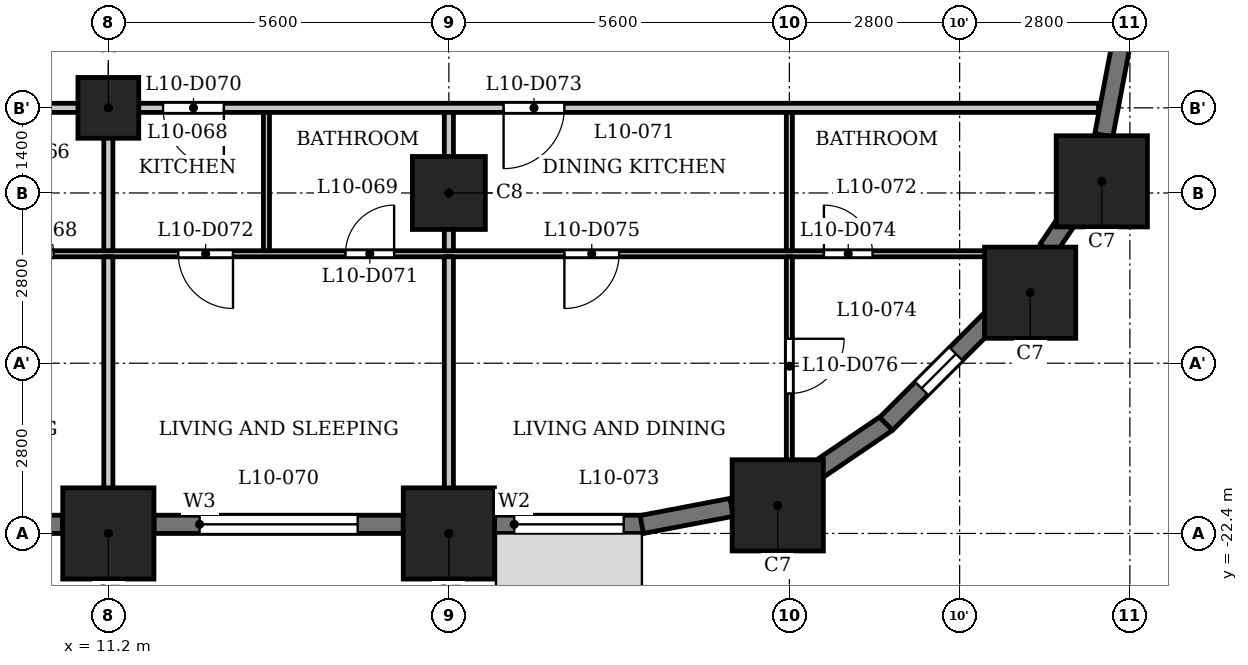
"""IFC4 building model, lengths in metres.
Left out: names, types, materials, properties, quantities, classifications, styles, units other than length and angle.
Written with IfcOpenShell. Run it as: python <this file> out.ifc"""

import sys

from ifc_helpers import new_model, si_unit, direction, frame, frame_2d, origin, origin_2d, place, context, subcontext, project, spatial, rectangle, extrude, element, fill, save


model = new_model("IFC4")
c1 = context("Model", 3, precision=1e-05, world=origin(), true_north=direction((0.0, 1.0)))
c2 = subcontext(c1, "Body", "Model", "MODEL_VIEW")
j1 = project(units=[si_unit("LENGTHUNIT", "METRE"), si_unit("PLANEANGLEUNIT", "RADIAN")], contexts=[c1])
p1 = place(None, origin())
s1 = spatial("IfcSite", under=j1, at=p1, CompositionType="ELEMENT")
p2 = place(p1, origin())
s2 = spatial("IfcBuilding", under=s1, at=p2, CompositionType="ELEMENT")
p3 = place(p2, frame((0.0, 0.0, 44.5)))
s3 = spatial("IfcBuildingStorey", under=s2, at=p3, CompositionType="ELEMENT", Elevation=44.5)
for number, where, z_axis, x_axis in (
    (1, (11.2, -22.4, 0.0), (0.0, 0.0, 1.0), (1.0, 0.0, 0.0)),
    (2, (16.8, -22.4, 0.0), (0.0, 0.0, 1.0), (1.0, 0.0, 0.0)),
    (3, (22.209, -21.938, 0.0), (0.0, 0.0, 1.0), (1.0, 0.0, 0.0)),
    (4, (26.36, -18.44, 0.0), (0.0, 0.0, 1.0), (1.0, 0.0, 0.0)),
    (5, (27.538, -16.609, 0.0), (0.0, 0.0, 1.0), (1.0, 0.0, 0.0)),
):
    element("IfcColumn", number, at=place(p3, frame(where, z_axis=z_axis, x_axis=x_axis)), inside=s3, PredefinedType="COLUMN", context=c2, shape_type="SweptSolid", body=[
        extrude(rectangle(XDim=1.5, YDim=1.5, at=origin_2d()), origin(), (0.0, 0.0, 1.0), 3.5),
    ])
p4 = place(p3, frame((16.8, -16.8, 0.0), z_axis=(0.0, 0.0, 1.0), x_axis=(1.0, 0.0, 0.0)))
e6 = element("IfcColumn", 6, at=p4, inside=s3, PredefinedType="COLUMN", context=c2, shape_type="SweptSolid", body=[
    extrude(rectangle(XDim=1.2, YDim=1.2, at=origin_2d()), origin(), (0.0, 0.0, 1.0), 3.5),
])
p5 = place(p3, frame((11.2, -15.4, 0.0), z_axis=(0.0, 0.0, 1.0), x_axis=(1.0, 0.0, 0.0)))
e7 = element("IfcColumn", 7, at=p5, inside=s3, PredefinedType="COLUMN", context=c2, shape_type="SweptSolid", body=[
    extrude(rectangle(XDim=1.0, YDim=1.0, at=origin_2d()), origin(), (0.0, 0.0, 1.0), 3.5),
])
p6 = place(p3, frame((6.35, -22.25, 0.0), z_axis=(0.0, 0.0, 1.0), x_axis=(1.0, 0.0, 0.0)))
e8 = element("IfcWall", 8, at=p6, inside=s3, PredefinedType="SOLIDWALL", context=c2, shape_type="SweptSolid", body=[
    extrude(rectangle(XDim=4.1, YDim=0.3, at=frame_2d((2.05, 0.0))), origin(), (0.0, 0.0, 1.0), 2.35),
])
p7 = place(p6, frame((0.75, 0.0, 0.9)))
e9 = element("IfcOpeningElement", 9, at=p7, cuts=e8, PredefinedType="OPENING", context=c2, shape_type="SweptSolid", body=[
    extrude(rectangle(XDim=2.6, YDim=1.25, at=frame_2d((1.3, 0.625))), frame((0.0, 0.16, 0.0), z_axis=(0.0, -1.0, 0.0), x_axis=(1.0, 0.0, 0.0)), (0.0, 0.0, 1.0), 0.32),
])
p8 = place(p3, frame((11.95, -22.25, 0.0), z_axis=(0.0, 0.0, 1.0), x_axis=(1.0, 0.0, 0.0)))
e10 = element("IfcWall", 10, at=p8, inside=s3, PredefinedType="SOLIDWALL", context=c2, shape_type="SweptSolid", body=[
    extrude(rectangle(XDim=4.1, YDim=0.3, at=frame_2d((2.05, 0.0))), origin(), (0.0, 0.0, 1.0), 2.35),
])
p9 = place(p8, frame((0.75, 0.0, 0.9)))
e11 = element("IfcOpeningElement", 11, at=p9, cuts=e10, PredefinedType="OPENING", context=c2, shape_type="SweptSolid", body=[
    extrude(rectangle(XDim=2.6, YDim=1.25, at=frame_2d((1.3, 0.625))), frame((0.0, 0.16, 0.0), z_axis=(0.0, -1.0, 0.0), x_axis=(1.0, 0.0, 0.0)), (0.0, 0.0, 1.0), 0.32),
])
p10 = place(p3, frame((17.55, -22.25, 0.0), z_axis=(0.0, 0.0, 1.0), x_axis=(1.0, 0.0, 0.0)))
e12 = element("IfcWall", 12, at=p10, inside=s3, PredefinedType="SOLIDWALL", context=c2, shape_type="SweptSolid", body=[
    extrude(rectangle(XDim=2.45, YDim=0.3, at=frame_2d((1.225, 0.0))), origin(), (0.0, 0.0, 1.0), 2.35),
])
p11 = place(p10, frame((0.325, 0.0, 0.9)))
e13 = element("IfcOpeningElement", 13, at=p11, cuts=e12, PredefinedType="OPENING", context=c2, shape_type="SweptSolid", body=[
    extrude(rectangle(XDim=1.8, YDim=1.25, at=frame_2d((0.9, 0.625))), frame((0.0, 0.16, 0.0), z_axis=(0.0, -1.0, 0.0), x_axis=(1.0, 0.0, 0.0)), (0.0, 0.0, 1.0), 0.32),
])
for number, where, z_axis, x_axis in (
    (14, (19.972, -22.253, 0.0), (0.0, 0.0, 1.0), (0.982, 0.187, 0.0)),
    (15, (22.767, -21.426, 0.0), (0.0, 0.0, 1.0), (0.827, 0.562, 0.0)),
):
    element("IfcWall", number, at=place(p3, frame(where, z_axis=z_axis, x_axis=x_axis)), inside=s3, PredefinedType="SOLIDWALL", context=c2, shape_type="SweptSolid", body=[
        extrude(rectangle(XDim=1.506, YDim=0.3, at=frame_2d((0.753, 0.0))), origin(), (0.0, 0.0, 1.0), 2.35),
    ])
p12 = place(p3, frame((23.991, -20.597, 0.0), z_axis=(0.0, 0.0, 1.0), x_axis=(0.707106781187, 0.707106781187, 0.0)))
e16 = element("IfcWall", 16, at=p12, inside=s3, PredefinedType="SOLIDWALL", context=c2, shape_type="SweptSolid", body=[
    extrude(rectangle(XDim=2.45, YDim=0.3, at=frame_2d((1.225, 0.0))), origin(), (0.0, 0.0, 1.0), 2.35),
])
p13 = place(p12, frame((0.825, 0.0, 0.6)))
e17 = element("IfcOpeningElement", 17, at=p13, cuts=e16, PredefinedType="OPENING", context=c2, shape_type="SweptSolid", body=[
    extrude(rectangle(XDim=0.8, YDim=1.55, at=frame_2d((0.4, 0.775))), frame((0.0, 0.16, 0.0), z_axis=(0.0, -1.0, 0.0), x_axis=(1.0, 0.0, 0.0)), (0.0, 0.0, 1.0), 0.32),
])
p14 = place(p3, frame((26.645, -17.727, 0.0), z_axis=(0.0, 0.0, 1.0), x_axis=(0.562083182981, 0.827080706709, 0.0)))
e18 = element("IfcWall", 18, at=p14, inside=s3, PredefinedType="SOLIDWALL", context=c2, shape_type="SweptSolid", body=[
    extrude(rectangle(XDim=0.677, YDim=0.3, at=frame_2d((0.339, 0.0))), origin(), (0.0, 0.0, 1.0), 3.2),
])
p15 = place(p3, frame((27.571, -15.851, 0.0), z_axis=(0.0, 0.0, 1.0), x_axis=(0.187223837635, 0.982317277982, 0.0)))
e19 = element("IfcWall", 19, at=p15, inside=s3, PredefinedType="SOLIDWALL", context=c2, shape_type="SweptSolid", body=[
    extrude(rectangle(XDim=1.506, YDim=0.3, at=frame_2d((0.753, 0.0))), origin(), (0.0, 0.0, 1.0), 2.35),
])
p16 = place(p3, frame((-26.394, -17.8, 0.0), z_axis=(0.0, 0.0, 1.0), x_axis=(1.0, 0.0, 0.0)))
e20 = element("IfcWall", 20, at=p16, inside=s3, PredefinedType="PARTITIONING", context=c2, shape_type="SweptSolid", body=[
    extrude(rectangle(XDim=53.126, YDim=0.1, at=frame_2d((26.563, 0.0))), origin(), (0.0, 0.0, 1.0), 3.2),
])
p17 = place(p16, frame((0.794, 0.0, 0.0)))
e21 = element("IfcOpeningElement", 21, at=p17, cuts=e20, PredefinedType="OPENING", context=c2, shape_type="SweptSolid", body=[
    extrude(rectangle(XDim=0.8, YDim=2.1, at=frame_2d((0.4, 1.05))), frame((0.0, 0.06, 0.0), z_axis=(0.0, -1.0, 0.0), x_axis=(1.0, 0.0, 0.0)), (0.0, 0.0, 1.0), 0.12),
])
p18 = place(p16, frame((5.644, 0.0, 0.0)))
e22 = element("IfcOpeningElement", 22, at=p18, cuts=e20, PredefinedType="OPENING", context=c2, shape_type="SweptSolid", body=[
    extrude(rectangle(XDim=0.9, YDim=2.1, at=frame_2d((0.45, 1.05))), frame((0.0, 0.06, 0.0), z_axis=(0.0, -1.0, 0.0), x_axis=(1.0, 0.0, 0.0)), (0.0, 0.0, 1.0), 0.12),
])
p19 = place(p16, frame((10.394, 0.0, 0.0)))
e23 = element("IfcOpeningElement", 23, at=p19, cuts=e20, PredefinedType="OPENING", context=c2, shape_type="SweptSolid", body=[
    extrude(rectangle(XDim=0.8, YDim=2.1, at=frame_2d((0.4, 1.05))), frame((0.0, 0.06, 0.0), z_axis=(0.0, -1.0, 0.0), x_axis=(1.0, 0.0, 0.0)), (0.0, 0.0, 1.0), 0.12),
])
p20 = place(p16, frame((13.244, 0.0, 0.0)))
e24 = element("IfcOpeningElement", 24, at=p20, cuts=e20, PredefinedType="OPENING", context=c2, shape_type="SweptSolid", body=[
    extrude(rectangle(XDim=0.9, YDim=2.1, at=frame_2d((0.45, 1.05))), frame((0.0, 0.06, 0.0), z_axis=(0.0, -1.0, 0.0), x_axis=(1.0, 0.0, 0.0)), (0.0, 0.0, 1.0), 0.12),
])
p21 = place(p16, frame((23.944, 0.0, 0.0)))
e25 = element("IfcOpeningElement", 25, at=p21, cuts=e20, PredefinedType="OPENING", context=c2, shape_type="SweptSolid", body=[
    extrude(rectangle(XDim=0.8, YDim=2.1, at=frame_2d((0.4, 1.05))), frame((0.0, 0.06, 0.0), z_axis=(0.0, -1.0, 0.0), x_axis=(1.0, 0.0, 0.0)), (0.0, 0.0, 1.0), 0.12),
])
p22 = place(p16, frame((22.194, 0.0, 0.0)))
e26 = element("IfcOpeningElement", 26, at=p22, cuts=e20, PredefinedType="OPENING", context=c2, shape_type="SweptSolid", body=[
    extrude(rectangle(XDim=0.9, YDim=2.1, at=frame_2d((0.45, 1.05))), frame((0.0, 0.06, 0.0), z_axis=(0.0, -1.0, 0.0), x_axis=(1.0, 0.0, 0.0)), (0.0, 0.0, 1.0), 0.12),
])
p23 = place(p16, frame((16.594, 0.0, 0.0)))
e27 = element("IfcOpeningElement", 27, at=p23, cuts=e20, PredefinedType="OPENING", context=c2, shape_type="SweptSolid", body=[
    extrude(rectangle(XDim=0.9, YDim=2.1, at=frame_2d((0.45, 1.05))), frame((0.0, 0.06, 0.0), z_axis=(0.0, -1.0, 0.0), x_axis=(1.0, 0.0, 0.0)), (0.0, 0.0, 1.0), 0.12),
])
p24 = place(p16, frame((18.844, 0.0, 0.0)))
e28 = element("IfcOpeningElement", 28, at=p24, cuts=e20, PredefinedType="OPENING", context=c2, shape_type="SweptSolid", body=[
    extrude(rectangle(XDim=0.9, YDim=2.1, at=frame_2d((0.45, 1.05))), frame((0.0, 0.06, 0.0), z_axis=(0.0, -1.0, 0.0), x_axis=(1.0, 0.0, 0.0)), (0.0, 0.0, 1.0), 0.12),
])
p25 = place(p16, frame((30.544, 0.0, 0.0)))
e29 = element("IfcOpeningElement", 29, at=p25, cuts=e20, PredefinedType="OPENING", context=c2, shape_type="SweptSolid", body=[
    extrude(rectangle(XDim=0.8, YDim=2.1, at=frame_2d((0.4, 1.05))), frame((0.0, 0.06, 0.0), z_axis=(0.0, -1.0, 0.0), x_axis=(1.0, 0.0, 0.0)), (0.0, 0.0, 1.0), 0.12),
])
p26 = place(p16, frame((27.294, 0.0, 0.0)))
e30 = element("IfcOpeningElement", 30, at=p26, cuts=e20, PredefinedType="OPENING", context=c2, shape_type="SweptSolid", body=[
    extrude(rectangle(XDim=0.9, YDim=2.1, at=frame_2d((0.45, 1.05))), frame((0.0, 0.06, 0.0), z_axis=(0.0, -1.0, 0.0), x_axis=(1.0, 0.0, 0.0)), (0.0, 0.0, 1.0), 0.12),
])
p27 = place(p16, frame((35.894, 0.0, 0.0)))
e31 = element("IfcOpeningElement", 31, at=p27, cuts=e20, PredefinedType="OPENING", context=c2, shape_type="SweptSolid", body=[
    extrude(rectangle(XDim=0.8, YDim=2.1, at=frame_2d((0.4, 1.05))), frame((0.0, 0.06, 0.0), z_axis=(0.0, -1.0, 0.0), x_axis=(1.0, 0.0, 0.0)), (0.0, 0.0, 1.0), 0.12),
])
p28 = place(p16, frame((33.644, 0.0, 0.0)))
e32 = element("IfcOpeningElement", 32, at=p28, cuts=e20, PredefinedType="OPENING", context=c2, shape_type="SweptSolid", body=[
    extrude(rectangle(XDim=0.9, YDim=2.1, at=frame_2d((0.45, 1.05))), frame((0.0, 0.06, 0.0), z_axis=(0.0, -1.0, 0.0), x_axis=(1.0, 0.0, 0.0)), (0.0, 0.0, 1.0), 0.12),
])
p29 = place(p16, frame((41.494, 0.0, 0.0)))
e33 = element("IfcOpeningElement", 33, at=p29, cuts=e20, PredefinedType="OPENING", context=c2, shape_type="SweptSolid", body=[
    extrude(rectangle(XDim=0.8, YDim=2.1, at=frame_2d((0.4, 1.05))), frame((0.0, 0.06, 0.0), z_axis=(0.0, -1.0, 0.0), x_axis=(1.0, 0.0, 0.0)), (0.0, 0.0, 1.0), 0.12),
])
p30 = place(p16, frame((38.744, 0.0, 0.0)))
e34 = element("IfcOpeningElement", 34, at=p30, cuts=e20, PredefinedType="OPENING", context=c2, shape_type="SweptSolid", body=[
    extrude(rectangle(XDim=0.9, YDim=2.1, at=frame_2d((0.45, 1.05))), frame((0.0, 0.06, 0.0), z_axis=(0.0, -1.0, 0.0), x_axis=(1.0, 0.0, 0.0)), (0.0, 0.0, 1.0), 0.12),
])
p31 = place(p16, frame((49.362, 0.0, 0.0)))
e35 = element("IfcOpeningElement", 35, at=p31, cuts=e20, PredefinedType="OPENING", context=c2, shape_type="SweptSolid", body=[
    extrude(rectangle(XDim=0.8, YDim=2.1, at=frame_2d((0.4, 1.05))), frame((0.0, 0.06, 0.0), z_axis=(0.0, -1.0, 0.0), x_axis=(1.0, 0.0, 0.0)), (0.0, 0.0, 1.0), 0.12),
])
p32 = place(p16, frame((45.094, 0.0, 0.0)))
e36 = element("IfcOpeningElement", 36, at=p32, cuts=e20, PredefinedType="OPENING", context=c2, shape_type="SweptSolid", body=[
    extrude(rectangle(XDim=0.9, YDim=2.1, at=frame_2d((0.45, 1.05))), frame((0.0, 0.06, 0.0), z_axis=(0.0, -1.0, 0.0), x_axis=(1.0, 0.0, 0.0)), (0.0, 0.0, 1.0), 0.12),
])
p33 = place(p3, frame((-27.484, -15.4, 0.0), z_axis=(0.0, 0.0, 1.0), x_axis=(1.0, 0.0, 0.0)))
e37 = element("IfcWall", 37, at=p33, inside=s3, PredefinedType="PARTITIONING", context=c2, shape_type="SweptSolid", body=[
    extrude(rectangle(XDim=54.968, YDim=0.15, at=frame_2d((27.484, 0.0))), origin(), (0.0, 0.0, 1.0), 3.2),
])
p34 = place(p33, frame((5.734, 0.0, 0.0)))
e38 = element("IfcOpeningElement", 38, at=p34, cuts=e37, PredefinedType="OPENING", context=c2, shape_type="SweptSolid", body=[
    extrude(rectangle(XDim=1.0, YDim=2.1, at=frame_2d((0.5, 1.05))), frame((0.0, 0.085, 0.0), z_axis=(0.0, -1.0, 0.0), x_axis=(1.0, 0.0, 0.0)), (0.0, 0.0, 1.0), 0.17),
])
p35 = place(p33, frame((13.334, 0.0, 0.0)))
e39 = element("IfcOpeningElement", 39, at=p35, cuts=e37, PredefinedType="OPENING", context=c2, shape_type="SweptSolid", body=[
    extrude(rectangle(XDim=1.0, YDim=2.1, at=frame_2d((0.5, 1.05))), frame((0.0, 0.085, 0.0), z_axis=(0.0, -1.0, 0.0), x_axis=(1.0, 0.0, 0.0)), (0.0, 0.0, 1.0), 0.17),
])
p36 = place(p33, frame((20.184, 0.0, 0.0)))
e40 = element("IfcOpeningElement", 40, at=p36, cuts=e37, PredefinedType="OPENING", context=c2, shape_type="SweptSolid", body=[
    extrude(rectangle(XDim=1.0, YDim=2.1, at=frame_2d((0.5, 1.05))), frame((0.0, 0.085, 0.0), z_axis=(0.0, -1.0, 0.0), x_axis=(1.0, 0.0, 0.0)), (0.0, 0.0, 1.0), 0.17),
])
p37 = place(p33, frame((29.384, 0.0, 0.0)))
e41 = element("IfcOpeningElement", 41, at=p37, cuts=e37, PredefinedType="OPENING", context=c2, shape_type="SweptSolid", body=[
    extrude(rectangle(XDim=1.0, YDim=2.1, at=frame_2d((0.5, 1.05))), frame((0.0, 0.085, 0.0), z_axis=(0.0, -1.0, 0.0), x_axis=(1.0, 0.0, 0.0)), (0.0, 0.0, 1.0), 0.17),
])
p38 = place(p33, frame((33.734, 0.0, 0.0)))
e42 = element("IfcOpeningElement", 42, at=p38, cuts=e37, PredefinedType="OPENING", context=c2, shape_type="SweptSolid", body=[
    extrude(rectangle(XDim=1.0, YDim=2.1, at=frame_2d((0.5, 1.05))), frame((0.0, 0.085, 0.0), z_axis=(0.0, -1.0, 0.0), x_axis=(1.0, 0.0, 0.0)), (0.0, 0.0, 1.0), 0.17),
])
p39 = place(p33, frame((39.584, 0.0, 0.0)))
e43 = element("IfcOpeningElement", 43, at=p39, cuts=e37, PredefinedType="OPENING", context=c2, shape_type="SweptSolid", body=[
    extrude(rectangle(XDim=1.0, YDim=2.1, at=frame_2d((0.5, 1.05))), frame((0.0, 0.085, 0.0), z_axis=(0.0, -1.0, 0.0), x_axis=(1.0, 0.0, 0.0)), (0.0, 0.0, 1.0), 0.17),
])
p40 = place(p33, frame((45.184, 0.0, 0.0)))
e44 = element("IfcOpeningElement", 44, at=p40, cuts=e37, PredefinedType="OPENING", context=c2, shape_type="SweptSolid", body=[
    extrude(rectangle(XDim=1.0, YDim=2.1, at=frame_2d((0.5, 1.05))), frame((0.0, 0.085, 0.0), z_axis=(0.0, -1.0, 0.0), x_axis=(1.0, 0.0, 0.0)), (0.0, 0.0, 1.0), 0.17),
])
p41 = place(p3, frame((11.2, -23.13, 0.0), z_axis=(0.0, 0.0, 1.0), x_axis=(0.0, 1.0, 0.0)))
e45 = element("IfcWall", 45, at=p41, inside=s3, PredefinedType="PARTITIONING", context=c2, shape_type="SweptSolid", body=[
    extrude(rectangle(XDim=5.28, YDim=0.15, at=frame_2d((2.64, 0.0))), origin(), (0.0, 0.0, 1.0), 3.2),
])
p42 = place(p3, frame((11.2, -17.75, 0.0), z_axis=(0.0, 0.0, 1.0), x_axis=(0.0, 1.0, 0.0)))
e46 = element("IfcWall", 46, at=p42, inside=s3, PredefinedType="PARTITIONING", context=c2, shape_type="SweptSolid", body=[
    extrude(rectangle(XDim=2.275, YDim=0.15, at=frame_2d((1.137, 0.0))), origin(), (0.0, 0.0, 1.0), 3.2),
])
p43 = place(p3, frame((13.8, -17.75, 0.0), z_axis=(0.0, 0.0, 1.0), x_axis=(0.0, 1.0, 0.0)))
e47 = element("IfcWall", 47, at=p43, inside=s3, PredefinedType="PARTITIONING", context=c2, shape_type="SweptSolid", body=[
    extrude(rectangle(XDim=2.275, YDim=0.1, at=frame_2d((1.137, 0.0))), origin(), (0.0, 0.0, 1.0), 3.2),
])
p44 = place(p3, frame((16.8, -23.13, 0.0), z_axis=(0.0, 0.0, 1.0), x_axis=(0.0, 1.0, 0.0)))
e48 = element("IfcWall", 48, at=p44, inside=s3, PredefinedType="PARTITIONING", context=c2, shape_type="SweptSolid", body=[
    extrude(rectangle(XDim=5.28, YDim=0.15, at=frame_2d((2.64, 0.0))), origin(), (0.0, 0.0, 1.0), 3.2),
])
p45 = place(p3, frame((16.8, -17.75, 0.0), z_axis=(0.0, 0.0, 1.0), x_axis=(0.0, 1.0, 0.0)))
e49 = element("IfcWall", 49, at=p45, inside=s3, PredefinedType="PARTITIONING", context=c2, shape_type="SweptSolid", body=[
    extrude(rectangle(XDim=2.275, YDim=0.15, at=frame_2d((1.137, 0.0))), origin(), (0.0, 0.0, 1.0), 3.2),
])
p46 = place(p3, frame((22.4, -21.72, 0.0), z_axis=(0.0, 0.0, 1.0), x_axis=(0.0, 1.0, 0.0)))
e50 = element("IfcWall", 50, at=p46, inside=s3, PredefinedType="PARTITIONING", context=c2, shape_type="SweptSolid", body=[
    extrude(rectangle(XDim=3.87, YDim=0.1, at=frame_2d((1.935, 0.0))), origin(), (0.0, 0.0, 1.0), 3.2),
])
p47 = place(p46, frame((1.622, 0.0, 0.0)))
e51 = element("IfcOpeningElement", 51, at=p47, cuts=e50, PredefinedType="OPENING", context=c2, shape_type="SweptSolid", body=[
    extrude(rectangle(XDim=0.9, YDim=2.1, at=frame_2d((0.45, 1.05))), frame((0.0, 0.06, 0.0), z_axis=(0.0, -1.0, 0.0), x_axis=(1.0, 0.0, 0.0)), (0.0, 0.0, 1.0), 0.12),
])
p48 = place(p3, frame((22.4, -17.75, 0.0), z_axis=(0.0, 0.0, 1.0), x_axis=(0.0, 1.0, 0.0)))
e52 = element("IfcWall", 52, at=p48, inside=s3, PredefinedType="PARTITIONING", context=c2, shape_type="SweptSolid", body=[
    extrude(rectangle(XDim=2.275, YDim=0.1, at=frame_2d((1.137, 0.0))), origin(), (0.0, 0.0, 1.0), 3.2),
])
p49 = place(p27, origin())
e53 = element("IfcDoor", 53, at=p49, inside=s3, OperationType="SINGLE_SWING_RIGHT", PredefinedType="DOOR", context=c2, shape_type="SweptSolid", body=[
    extrude(rectangle(XDim=0.8, YDim=2.1, at=frame_2d((0.4, 1.05))), frame((0.0, 0.025, 0.0), z_axis=(0.0, -1.0, 0.0), x_axis=(1.0, 0.0, 0.0)), (0.0, 0.0, 1.0), 0.05),
])
fill(e31, e53)
p50 = place(p39, origin())
e54 = element("IfcDoor", 54, at=p50, inside=s3, OperationType="SINGLE_SWING_RIGHT", PredefinedType="DOOR", context=c2, shape_type="SweptSolid", body=[
    extrude(rectangle(XDim=1.0, YDim=2.1, at=frame_2d((0.5, 1.05))), frame((0.0, 0.025, 0.0), z_axis=(0.0, -1.0, 0.0), x_axis=(1.0, 0.0, 0.0)), (0.0, 0.0, 1.0), 0.05),
])
fill(e43, e54)
p51 = place(p29, origin())
e55 = element("IfcDoor", 55, at=p51, inside=s3, OperationType="SINGLE_SWING_LEFT", PredefinedType="DOOR", context=c2, shape_type="SweptSolid", body=[
    extrude(rectangle(XDim=0.8, YDim=2.1, at=frame_2d((0.4, 1.05))), frame((0.0, 0.025, 0.0), z_axis=(0.0, -1.0, 0.0), x_axis=(1.0, 0.0, 0.0)), (0.0, 0.0, 1.0), 0.05),
])
fill(e33, e55)
p52 = place(p30, origin())
e56 = element("IfcDoor", 56, at=p52, inside=s3, OperationType="SINGLE_SWING_RIGHT", PredefinedType="DOOR", context=c2, shape_type="SweptSolid", body=[
    extrude(rectangle(XDim=0.9, YDim=2.1, at=frame_2d((0.45, 1.05))), frame((0.0, 0.025, 0.0), z_axis=(0.0, -1.0, 0.0), x_axis=(1.0, 0.0, 0.0)), (0.0, 0.0, 1.0), 0.05),
])
fill(e34, e56)
p53 = place(p40, origin())
e57 = element("IfcDoor", 57, at=p53, inside=s3, OperationType="SINGLE_SWING_LEFT", PredefinedType="DOOR", context=c2, shape_type="SweptSolid", body=[
    extrude(rectangle(XDim=1.0, YDim=2.1, at=frame_2d((0.5, 1.05))), frame((0.0, 0.025, 0.0), z_axis=(0.0, -1.0, 0.0), x_axis=(1.0, 0.0, 0.0)), (0.0, 0.0, 1.0), 0.05),
])
fill(e44, e57)
p54 = place(p31, origin())
e58 = element("IfcDoor", 58, at=p54, inside=s3, OperationType="SINGLE_SWING_RIGHT", PredefinedType="DOOR", context=c2, shape_type="SweptSolid", body=[
    extrude(rectangle(XDim=0.8, YDim=2.1, at=frame_2d((0.4, 1.05))), frame((0.0, 0.025, 0.0), z_axis=(0.0, -1.0, 0.0), x_axis=(1.0, 0.0, 0.0)), (0.0, 0.0, 1.0), 0.05),
])
fill(e35, e58)
p55 = place(p32, origin())
e59 = element("IfcDoor", 59, at=p55, inside=s3, OperationType="SINGLE_SWING_LEFT", PredefinedType="DOOR", context=c2, shape_type="SweptSolid", body=[
    extrude(rectangle(XDim=0.9, YDim=2.1, at=frame_2d((0.45, 1.05))), frame((0.0, 0.025, 0.0), z_axis=(0.0, -1.0, 0.0), x_axis=(1.0, 0.0, 0.0)), (0.0, 0.0, 1.0), 0.05),
])
fill(e36, e59)
p56 = place(p47, origin())
e60 = element("IfcDoor", 60, at=p56, inside=s3, OperationType="SINGLE_SWING_RIGHT", PredefinedType="DOOR", context=c2, shape_type="SweptSolid", body=[
    extrude(rectangle(XDim=0.9, YDim=2.1, at=frame_2d((0.45, 1.05))), frame((0.0, 0.025, 0.0), z_axis=(0.0, -1.0, 0.0), x_axis=(1.0, 0.0, 0.0)), (0.0, 0.0, 1.0), 0.05),
])
fill(e51, e60)
p57 = place(p9, origin())
e61 = element("IfcWindow", 61, at=p57, inside=s3, PartitioningType="SINGLE_PANEL", PredefinedType="WINDOW", context=c2, shape_type="SweptSolid", body=[
    extrude(rectangle(XDim=2.6, YDim=1.25, at=frame_2d((1.3, 0.625))), frame((0.0, 0.03, 0.0), z_axis=(0.0, -1.0, 0.0), x_axis=(1.0, 0.0, 0.0)), (0.0, 0.0, 1.0), 0.06),
])
fill(e11, e61)
p58 = place(p11, origin())
e62 = element("IfcWindow", 62, at=p58, inside=s3, PartitioningType="SINGLE_PANEL", PredefinedType="WINDOW", context=c2, shape_type="SweptSolid", body=[
    extrude(rectangle(XDim=1.8, YDim=1.25, at=frame_2d((0.9, 0.625))), frame((0.0, 0.03, 0.0), z_axis=(0.0, -1.0, 0.0), x_axis=(1.0, 0.0, 0.0)), (0.0, 0.0, 1.0), 0.06),
])
fill(e13, e62)
p59 = place(p13, origin())
e63 = element("IfcWindow", 63, at=p59, inside=s3, PartitioningType="SINGLE_PANEL", PredefinedType="WINDOW", context=c2, shape_type="SweptSolid", body=[
    extrude(rectangle(XDim=0.8, YDim=1.55, at=frame_2d((0.4, 0.775))), frame((0.0, 0.03, 0.0), z_axis=(0.0, -1.0, 0.0), x_axis=(1.0, 0.0, 0.0)), (0.0, 0.0, 1.0), 0.06),
])
fill(e17, e63)
save(model, sys.argv[1])
